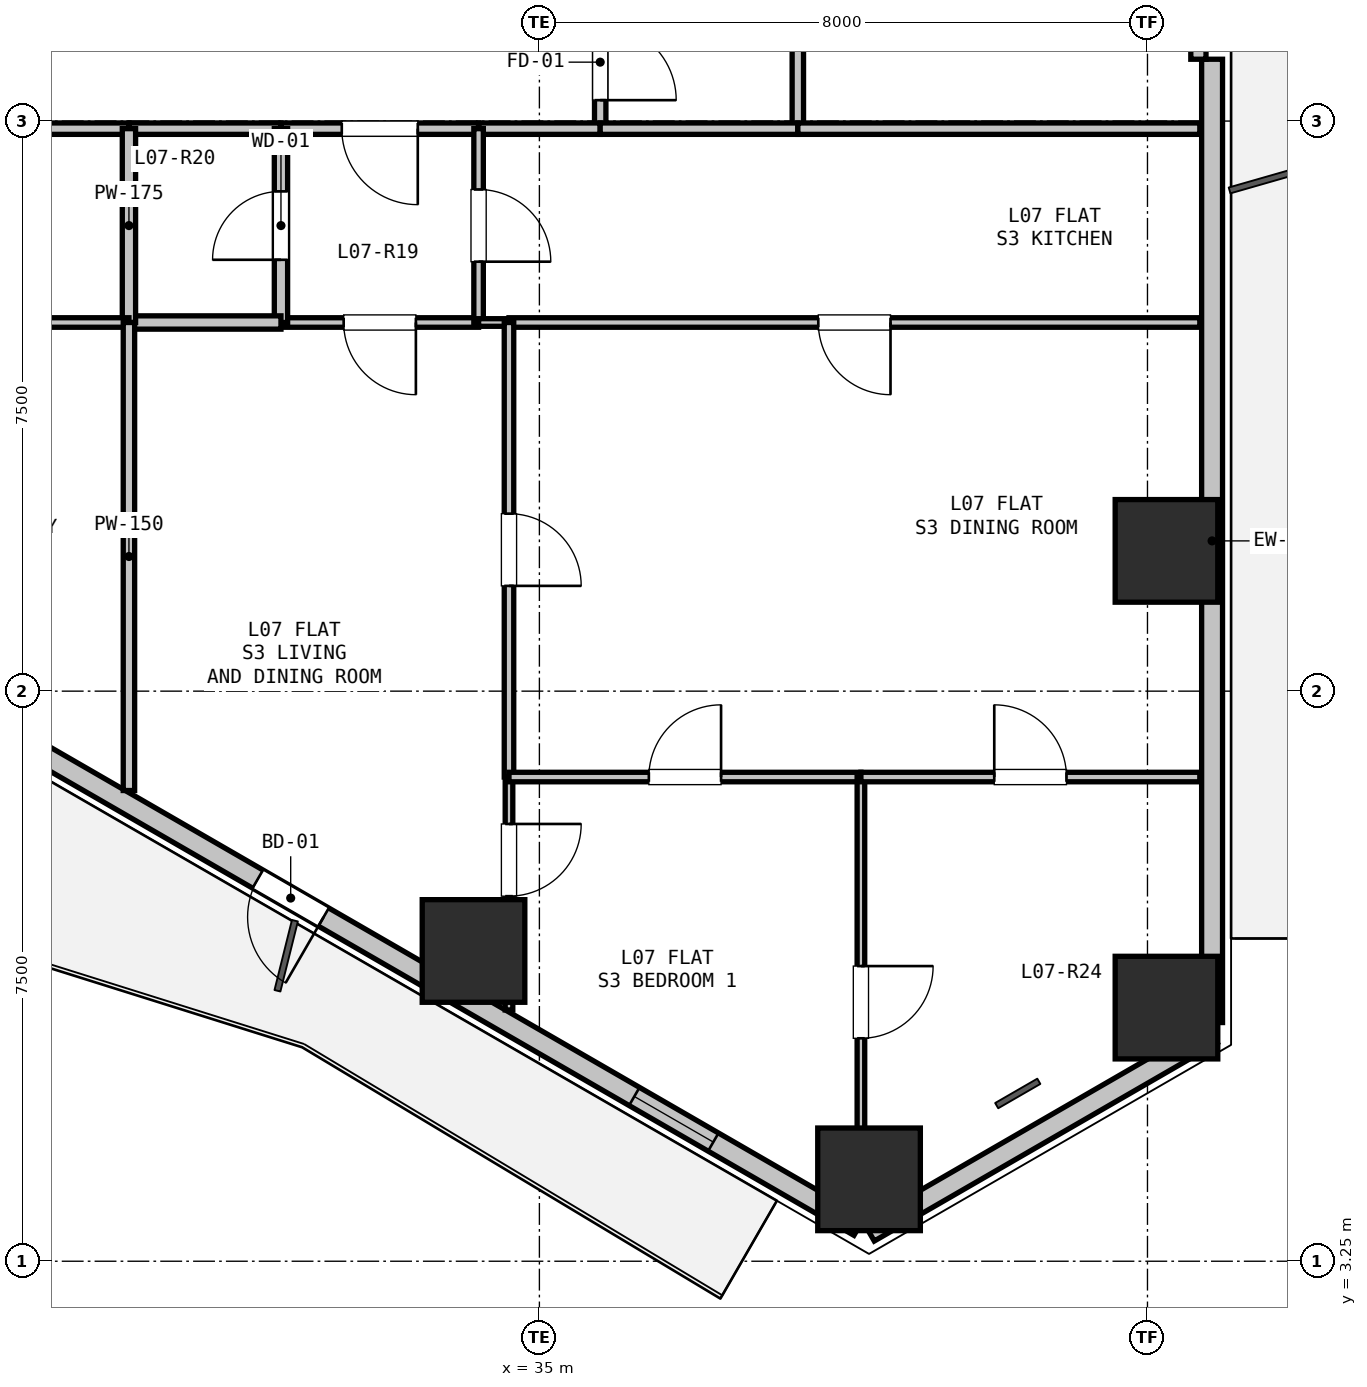
"""IFC4 building model, lengths in metres.
Left out: names, types, materials, properties, quantities, classifications, styles, units other than length and angle.
Written with IfcOpenShell. Run it as: python <this file> out.ifc"""

import sys

from ifc_helpers import new_model, si_unit, direction, frame, frame_2d, origin, origin_2d, place, context, subcontext, project, spatial, rectangle, hollow_rectangle, extrude, element, fill, save


model = new_model("IFC4")
c1 = context("Model", 3, precision=1e-05, world=origin(), true_north=direction((0.0, 1.0)))
c2 = subcontext(c1, "Body", "Model", "MODEL_VIEW")
j1 = project(units=[si_unit("LENGTHUNIT", "METRE"), si_unit("PLANEANGLEUNIT", "RADIAN")], contexts=[c1])
p1 = place(None, origin())
s1 = spatial("IfcSite", under=j1, at=p1, CompositionType="ELEMENT")
p2 = place(p1, origin())
s2 = spatial("IfcBuilding", under=s1, at=p2, CompositionType="ELEMENT")
p3 = place(p2, frame((0.0, 0.0, 29.1)))
s3 = spatial("IfcBuildingStorey", under=s2, at=p3, CompositionType="ELEMENT", Elevation=29.1)
for number, where, z_axis, x_axis in (
    (1, (43.25, 12.595, 0.0), (0.0, 0.0, 1.0), (1.0, 0.0, 0.0)),
    (2, (43.25, 6.587, 0.0), (0.0, 0.0, 1.0), (1.0, 0.0, 0.0)),
    (3, (39.337, 4.327, 0.0), (0.0, 0.0, 1.0), (1.0, 0.0, 0.0)),
    (4, (34.133, 7.332, 0.0), (0.0, 0.0, 1.0), (1.0, 0.0, 0.0)),
):
    element("IfcColumn", number, at=place(p3, frame(where, z_axis=z_axis, x_axis=x_axis)), inside=s3, PredefinedType="COLUMN", context=c2, shape_type="SweptSolid", body=[
        extrude(hollow_rectangle(XDim=1.35, YDim=1.35, WallThickness=0.036, at=origin_2d()), origin(), (0.0, 0.0, 1.0), 3.3),
    ])
p4 = place(p3, frame((43.85, 6.24, 0.0), z_axis=(0.0, 0.0, 1.0), x_axis=(-0.866043601342, -0.499968479581, 0.0)))
e5 = element("IfcWall", 5, at=p4, inside=s3, PredefinedType="SOLIDWALL", context=c2, shape_type="SweptSolid", body=[
    extrude(rectangle(XDim=5.211, YDim=0.275, at=frame_2d((2.605, 0.0))), origin(), (0.0, 0.0, 1.0), 2.66),
])
p5 = place(p3, frame((43.85, 19.063, 0.0), z_axis=(0.0, 0.0, 1.0), x_axis=(0.0, -1.0, 0.0)))
e6 = element("IfcWall", 6, at=p5, inside=s3, PredefinedType="SOLIDWALL", context=c2, shape_type="SweptSolid", body=[
    extrude(rectangle(XDim=12.673, YDim=0.275, at=frame_2d((6.336, 0.0))), origin(), (0.0, 0.0, 1.0), 2.66),
])
p6 = place(p3, frame((43.67, 20.763, 0.0), z_axis=(0.0, 0.0, 1.0), x_axis=(0.0, -1.0, 0.0)))
e7 = element("IfcWall", 7, at=p6, inside=s3, PredefinedType="PARAPET", context=c2, shape_type="SweptSolid", body=[
    extrude(rectangle(XDim=1.7, YDim=0.2, at=frame_2d((0.85, 0.0))), origin(), (0.0, 0.0, 1.0), 2.66),
])
p7 = place(p3, frame((39.207, 3.71, 0.0), z_axis=(0.0, 0.0, 1.0), x_axis=(-0.86603192154, 0.499988710747, 0.0)))
e8 = element("IfcWall", 8, at=p7, inside=s3, PredefinedType="SOLIDWALL", context=c2, shape_type="SweptSolid", body=[
    extrude(rectangle(XDim=12.673, YDim=0.275, at=frame_2d((6.336, 0.0))), origin(), (0.0, 0.0, 1.0), 2.66),
])
p8 = place(p7, frame((8.136, 0.0, 0.0)))
e9 = element("IfcOpeningElement", 9, at=p8, cuts=e8, PredefinedType="OPENING", context=c2, shape_type="SweptSolid", body=[
    extrude(rectangle(XDim=1.0, YDim=2.1, at=frame_2d((0.5, 1.05))), frame((0.0, 0.147, 0.0), z_axis=(0.0, -1.0, 0.0), x_axis=(1.0, 0.0, 0.0)), (0.0, 0.0, 1.0), 0.295),
])
p9 = place(p7, frame((2.216, 0.0, 0.9)))
e10 = element("IfcOpeningElement", 10, at=p9, cuts=e8, PredefinedType="OPENING", context=c2, shape_type="SweptSolid", body=[
    extrude(rectangle(XDim=1.2, YDim=1.4, at=frame_2d((0.6, 0.7))), frame((0.0, 0.147, 0.0), z_axis=(0.0, -1.0, 0.0), x_axis=(1.0, 0.0, 0.0)), (0.0, 0.0, 1.0), 0.295),
])
p10 = place(p3, frame((35.8, 19.9, 0.0), z_axis=(0.0, 0.0, 1.0), x_axis=(0.0, -1.0, 0.0)))
e11 = element("IfcWall", 11, at=p10, inside=s3, PredefinedType="PARTITIONING", context=c2, shape_type="SweptSolid", body=[
    extrude(rectangle(XDim=1.75, YDim=0.15, at=frame_2d((0.875, 0.0))), origin(), (0.0, 0.0, 1.0), 3.04),
])
p11 = place(p10, frame((0.375, 0.0, 0.0)))
e12 = element("IfcOpeningElement", 12, at=p11, cuts=e11, PredefinedType="OPENING", context=c2, shape_type="SweptSolid", body=[
    extrude(rectangle(XDim=1.0, YDim=2.15, at=frame_2d((0.5, 1.075))), frame((0.0, 0.085, 0.0), z_axis=(0.0, -1.0, 0.0), x_axis=(1.0, 0.0, 0.0)), (0.0, 0.0, 1.0), 0.17),
])
p12 = place(p3, frame((35.8, 18.15, 0.0), z_axis=(0.0, 0.0, 1.0), x_axis=(-1.0, 0.0, 0.0)))
e13 = element("IfcWall", 13, at=p12, inside=s3, PredefinedType="PARTITIONING", context=c2, shape_type="SweptSolid", body=[
    extrude(rectangle(XDim=1.6, YDim=0.15, at=frame_2d((0.8, 0.0))), origin(), (0.0, 0.0, 1.0), 3.04),
])
p13 = place(p3, frame((34.2, 18.15, 0.0), z_axis=(0.0, 0.0, 1.0), x_axis=(-1.0, 0.0, 0.0)))
e14 = element("IfcWall", 14, at=p13, inside=s3, PredefinedType="PARTITIONING", context=c2, shape_type="SweptSolid", body=[
    extrude(rectangle(XDim=2.6, YDim=0.15, at=frame_2d((1.3, 0.0))), origin(), (0.0, 0.0, 1.0), 3.04),
])
p14 = place(p13, frame((0.8, 0.0, 0.0)))
e15 = element("IfcOpeningElement", 15, at=p14, cuts=e14, PredefinedType="OPENING", context=c2, shape_type="SweptSolid", body=[
    extrude(rectangle(XDim=1.0, YDim=2.15, at=frame_2d((0.5, 1.075))), frame((0.0, 0.085, 0.0), z_axis=(0.0, -1.0, 0.0), x_axis=(1.0, 0.0, 0.0)), (0.0, 0.0, 1.0), 0.17),
])
p15 = place(p3, frame((31.6, 18.15, 0.0), z_axis=(0.0, 0.0, 1.0), x_axis=(-1.0, 0.0, 0.0)))
e16 = element("IfcWall", 16, at=p15, inside=s3, PredefinedType="PARTITIONING", context=c2, shape_type="SweptSolid", body=[
    extrude(rectangle(XDim=2.0, YDim=0.15, at=frame_2d((1.0, 0.0))), origin(), (0.0, 0.0, 1.0), 3.04),
])
p16 = place(p3, frame((29.6, 18.15, 0.0), z_axis=(0.0, 0.0, 1.0), x_axis=(-1.0, 0.0, 0.0)))
e17 = element("IfcWall", 17, at=p16, inside=s3, PredefinedType="PARTITIONING", context=c2, shape_type="SweptSolid", body=[
    extrude(rectangle(XDim=2.5, YDim=0.15, at=frame_2d((1.25, 0.0))), origin(), (0.0, 0.0, 1.0), 3.04),
])
p17 = place(p3, frame((38.4, 21.4, 0.0), z_axis=(0.0, 0.0, 1.0), x_axis=(0.0, -1.0, 0.0)))
e18 = element("IfcWall", 18, at=p17, inside=s3, PredefinedType="PARTITIONING", context=c2, shape_type="SweptSolid", body=[
    extrude(rectangle(XDim=3.25, YDim=0.15, at=frame_2d((1.625, 0.0))), origin(), (0.0, 0.0, 1.0), 3.04),
])
p18 = place(p3, frame((38.4, 18.15, 0.0), z_axis=(0.0, 0.0, 1.0), x_axis=(-1.0, 0.0, 0.0)))
e19 = element("IfcWall", 19, at=p18, inside=s3, PredefinedType="PARTITIONING", context=c2, shape_type="SweptSolid", body=[
    extrude(rectangle(XDim=2.6, YDim=0.15, at=frame_2d((1.3, 0.0))), origin(), (0.0, 0.0, 1.0), 2.337),
])
p19 = place(p3, frame((34.2, 15.6, 0.0), z_axis=(0.0, 0.0, 1.0), x_axis=(-1.0, 0.0, 0.0)))
e20 = element("IfcWall", 20, at=p19, inside=s3, PredefinedType="PARTITIONING", context=c2, shape_type="SweptSolid", body=[
    extrude(rectangle(XDim=2.6, YDim=0.125, at=frame_2d((1.3, 0.0))), origin(), (0.0, 0.0, 1.0), 3.04),
])
p20 = place(p19, frame((0.825, 0.0, 0.0)))
e21 = element("IfcOpeningElement", 21, at=p20, cuts=e20, PredefinedType="OPENING", context=c2, shape_type="SweptSolid", body=[
    extrude(rectangle(XDim=0.95, YDim=2.1, at=frame_2d((0.475, 1.05))), frame((0.0, 0.073, 0.0), z_axis=(0.0, -1.0, 0.0), x_axis=(1.0, 0.0, 0.0)), (0.0, 0.0, 1.0), 0.145),
])
p21 = place(p3, frame((31.6, 15.6, 0.0), z_axis=(0.0, 0.0, 1.0), x_axis=(0.0, 1.0, 0.0)))
e22 = element("IfcWall", 22, at=p21, inside=s3, PredefinedType="PLUMBINGWALL", context=c2, shape_type="SweptSolid", body=[
    extrude(rectangle(XDim=2.55, YDim=0.175, at=frame_2d((1.275, 0.0))), origin(), (0.0, 0.0, 1.0), 3.04),
])
p22 = place(p21, frame((0.825, 0.0, 0.0)))
e23 = element("IfcOpeningElement", 23, at=p22, cuts=e22, PredefinedType="OPENING", context=c2, shape_type="SweptSolid", body=[
    extrude(rectangle(XDim=0.9, YDim=2.1, at=frame_2d((0.45, 1.05))), frame((0.0, 0.097, 0.0), z_axis=(0.0, -1.0, 0.0), x_axis=(1.0, 0.0, 0.0)), (0.0, 0.0, 1.0), 0.195),
])
p23 = place(p3, frame((34.2, 18.15, 0.0), z_axis=(0.0, 0.0, 1.0), x_axis=(0.0, -1.0, 0.0)))
e24 = element("IfcWall", 24, at=p23, inside=s3, PredefinedType="PARTITIONING", context=c2, shape_type="SweptSolid", body=[
    extrude(rectangle(XDim=2.55, YDim=0.125, at=frame_2d((1.275, 0.0))), origin(), (0.0, 0.0, 1.0), 3.04),
])
p24 = place(p23, frame((0.8, 0.0, 0.0)))
e25 = element("IfcOpeningElement", 25, at=p24, cuts=e24, PredefinedType="OPENING", context=c2, shape_type="SweptSolid", body=[
    extrude(rectangle(XDim=0.95, YDim=2.1, at=frame_2d((0.475, 1.05))), frame((0.0, 0.073, 0.0), z_axis=(0.0, -1.0, 0.0), x_axis=(1.0, 0.0, 0.0)), (0.0, 0.0, 1.0), 0.145),
])
p25 = place(p3, frame((31.6, 15.6, 0.0), z_axis=(0.0, 0.0, 1.0), x_axis=(-1.0, 0.0, 0.0)))
e26 = element("IfcWall", 26, at=p25, inside=s3, PredefinedType="PLUMBINGWALL", context=c2, shape_type="SweptSolid", body=[
    extrude(rectangle(XDim=2.0, YDim=0.175, at=frame_2d((1.0, 0.0))), origin(), (0.0, 0.0, 1.0), 3.04),
])
p26 = place(p3, frame((29.6, 15.6, 0.0), z_axis=(0.0, 0.0, 1.0), x_axis=(0.0, 1.0, 0.0)))
e27 = element("IfcWall", 27, at=p26, inside=s3, PredefinedType="PLUMBINGWALL", context=c2, shape_type="SweptSolid", body=[
    extrude(rectangle(XDim=2.55, YDim=0.175, at=frame_2d((1.275, 0.0))), origin(), (0.0, 0.0, 1.0), 3.04),
])
p27 = place(p3, frame((38.4, 18.15, 0.0), z_axis=(0.0, 0.0, 1.0), x_axis=(1.0, 0.0, 0.0)))
e28 = element("IfcWall", 28, at=p27, inside=s3, PredefinedType="PARTITIONING", context=c2, shape_type="SweptSolid", body=[
    extrude(rectangle(XDim=5.289, YDim=0.15, at=frame_2d((2.644, 0.0))), origin(), (0.0, 0.0, 1.0), 2.365),
])
p28 = place(p3, frame((43.688, 15.6, 0.0), z_axis=(0.0, 0.0, 1.0), x_axis=(-1.0, 0.0, 0.0)))
e29 = element("IfcWall", 29, at=p28, inside=s3, PredefinedType="PARTITIONING", context=c2, shape_type="SweptSolid", body=[
    extrude(rectangle(XDim=9.088, YDim=0.125, at=frame_2d((4.544, 0.0))), origin(), (0.0, 0.0, 1.0), 2.337),
])
p29 = place(p28, frame((4.069, 0.0, 0.0)))
e30 = element("IfcOpeningElement", 30, at=p29, cuts=e29, PredefinedType="OPENING", context=c2, shape_type="SweptSolid", body=[
    extrude(rectangle(XDim=0.95, YDim=2.1, at=frame_2d((0.475, 1.05))), frame((0.0, 0.073, 0.0), z_axis=(0.0, -1.0, 0.0), x_axis=(1.0, 0.0, 0.0)), (0.0, 0.0, 1.0), 0.145),
])
p30 = place(p3, frame((34.6, 15.6, 0.0), z_axis=(0.0, 0.0, 1.0), x_axis=(-1.0, 0.0, 0.0)))
e31 = element("IfcWall", 31, at=p30, inside=s3, PredefinedType="PARTITIONING", context=c2, shape_type="SweptSolid", body=[
    extrude(rectangle(XDim=0.4, YDim=0.1, at=frame_2d((0.2, 0.0))), origin(), (0.0, 0.0, 1.0), 3.04),
])
p31 = place(p3, frame((27.1, 15.6, 0.0), z_axis=(0.0, 0.0, 1.0), x_axis=(1.0, 0.0, 0.0)))
e32 = element("IfcWall", 32, at=p31, inside=s3, PredefinedType="PARTITIONING", context=c2, shape_type="SweptSolid", body=[
    extrude(rectangle(XDim=2.5, YDim=0.125, at=frame_2d((1.25, 0.0))), origin(), (0.0, 0.0, 1.0), 3.04),
])
p32 = place(p3, frame((29.6, 15.6, 0.0), z_axis=(0.0, 0.0, 1.0), x_axis=(0.0, -1.0, 0.0)))
e33 = element("IfcWall", 33, at=p32, inside=s3, PredefinedType="PARTITIONING", context=c2, shape_type="SweptSolid", body=[
    extrude(rectangle(XDim=6.157, YDim=0.15, at=frame_2d((3.079, 0.0))), origin(), (0.0, 0.0, 1.0), 2.337),
])
p33 = place(p3, frame((34.6, 15.6, 0.0), z_axis=(0.0, 0.0, 1.0), x_axis=(0.0, -1.0, 0.0)))
e34 = element("IfcWall", 34, at=p33, inside=s3, PredefinedType="PARTITIONING", context=c2, shape_type="SweptSolid", body=[
    extrude(rectangle(XDim=5.98, YDim=0.125, at=frame_2d((2.99, 0.0))), origin(), (0.0, 0.0, 1.0), 3.04),
])
p34 = place(p33, frame((2.515, 0.0, 0.0)))
e35 = element("IfcOpeningElement", 35, at=p34, cuts=e34, PredefinedType="OPENING", context=c2, shape_type="SweptSolid", body=[
    extrude(rectangle(XDim=0.95, YDim=2.1, at=frame_2d((0.475, 1.05))), frame((0.0, 0.073, 0.0), z_axis=(0.0, -1.0, 0.0), x_axis=(1.0, 0.0, 0.0)), (0.0, 0.0, 1.0), 0.145),
])
p35 = place(p3, frame((34.6, 9.62, 0.0), z_axis=(0.0, 0.0, 1.0), x_axis=(0.0, -1.0, 0.0)))
e36 = element("IfcWall", 36, at=p35, inside=s3, PredefinedType="PARTITIONING", context=c2, shape_type="SweptSolid", body=[
    extrude(rectangle(XDim=3.064, YDim=0.1, at=frame_2d((1.532, 0.0))), origin(), (0.0, 0.0, 1.0), 2.65),
])
p36 = place(p35, frame((0.617, 0.0, 0.0)))
e37 = element("IfcOpeningElement", 37, at=p36, cuts=e36, PredefinedType="OPENING", context=c2, shape_type="SweptSolid", body=[
    extrude(rectangle(XDim=0.95, YDim=2.1, at=frame_2d((0.475, 1.05))), frame((0.0, 0.06, 0.0), z_axis=(0.0, -1.0, 0.0), x_axis=(1.0, 0.0, 0.0)), (0.0, 0.0, 1.0), 0.12),
])
p37 = place(p3, frame((34.6, 9.62, 0.0), z_axis=(0.0, 0.0, 1.0), x_axis=(1.0, 0.0, 0.0)))
e38 = element("IfcWall", 38, at=p37, inside=s3, PredefinedType="PARTITIONING", context=c2, shape_type="SweptSolid", body=[
    extrude(rectangle(XDim=4.63, YDim=0.125, at=frame_2d((2.315, 0.0))), origin(), (0.0, 0.0, 1.0), 3.04),
])
p38 = place(p37, frame((1.84, 0.0, 0.0)))
e39 = element("IfcOpeningElement", 39, at=p38, cuts=e38, PredefinedType="OPENING", context=c2, shape_type="SweptSolid", body=[
    extrude(rectangle(XDim=0.95, YDim=2.1, at=frame_2d((0.475, 1.05))), frame((0.0, 0.073, 0.0), z_axis=(0.0, -1.0, 0.0), x_axis=(1.0, 0.0, 0.0)), (0.0, 0.0, 1.0), 0.145),
])
p39 = place(p3, frame((39.23, 9.62, 0.0), z_axis=(0.0, 0.0, 1.0), x_axis=(0.0, -1.0, 0.0)))
e40 = element("IfcWall", 40, at=p39, inside=s3, PredefinedType="PARTITIONING", context=c2, shape_type="SweptSolid", body=[
    extrude(rectangle(XDim=5.924, YDim=0.1, at=frame_2d((2.962, 0.0))), origin(), (0.0, 0.0, 1.0), 3.04),
])
p40 = place(p39, frame((2.487, 0.0, 0.0)))
e41 = element("IfcOpeningElement", 41, at=p40, cuts=e40, PredefinedType="OPENING", context=c2, shape_type="SweptSolid", body=[
    extrude(rectangle(XDim=0.95, YDim=2.1, at=frame_2d((0.475, 1.05))), frame((0.0, 0.06, 0.0), z_axis=(0.0, -1.0, 0.0), x_axis=(1.0, 0.0, 0.0)), (0.0, 0.0, 1.0), 0.12),
])
p41 = place(p3, frame((39.23, 9.62, 0.0), z_axis=(0.0, 0.0, 1.0), x_axis=(1.0, 0.0, 0.0)))
e42 = element("IfcWall", 42, at=p41, inside=s3, PredefinedType="PARTITIONING", context=c2, shape_type="SweptSolid", body=[
    extrude(rectangle(XDim=4.458, YDim=0.125, at=frame_2d((2.229, 0.0))), origin(), (0.0, 0.0, 1.0), 2.337),
])
p42 = place(p41, frame((1.754, 0.0, 0.0)))
e43 = element("IfcOpeningElement", 43, at=p42, cuts=e42, PredefinedType="OPENING", context=c2, shape_type="SweptSolid", body=[
    extrude(rectangle(XDim=0.95, YDim=2.1, at=frame_2d((0.475, 1.05))), frame((0.0, 0.073, 0.0), z_axis=(0.0, -1.0, 0.0), x_axis=(1.0, 0.0, 0.0)), (0.0, 0.0, 1.0), 0.145),
])
p43 = place(p8, origin())
e44 = element("IfcDoor", 44, at=p43, inside=s3, OperationType="SINGLE_SWING_LEFT", PredefinedType="DOOR", context=c2, shape_type="SweptSolid", body=[
    extrude(rectangle(XDim=1.0, YDim=2.1, at=frame_2d((0.5, 1.05))), frame((0.0, 0.025, 0.0), z_axis=(0.0, -1.0, 0.0), x_axis=(1.0, 0.0, 0.0)), (0.0, 0.0, 1.0), 0.05),
])
fill(e9, e44)
p44 = place(p9, origin())
e45 = element("IfcWindow", 45, at=p44, inside=s3, PartitioningType="SINGLE_PANEL", PredefinedType="WINDOW", context=c2, shape_type="SweptSolid", body=[
    extrude(rectangle(XDim=1.2, YDim=1.4, at=frame_2d((0.6, 0.7))), frame((0.0, 0.03, 0.0), z_axis=(0.0, -1.0, 0.0), x_axis=(1.0, 0.0, 0.0)), (0.0, 0.0, 1.0), 0.06),
])
fill(e10, e45)
p45 = place(p11, origin())
e46 = element("IfcDoor", 46, at=p45, inside=s3, OperationType="SINGLE_SWING_RIGHT", PredefinedType="DOOR", context=c2, shape_type="SweptSolid", body=[
    extrude(rectangle(XDim=1.0, YDim=2.15, at=frame_2d((0.5, 1.075))), frame((0.0, 0.025, 0.0), z_axis=(0.0, -1.0, 0.0), x_axis=(1.0, 0.0, 0.0)), (0.0, 0.0, 1.0), 0.05),
])
fill(e12, e46)
p46 = place(p14, origin())
e47 = element("IfcDoor", 47, at=p46, inside=s3, OperationType="SINGLE_SWING_LEFT", PredefinedType="DOOR", context=c2, shape_type="SweptSolid", body=[
    extrude(rectangle(XDim=1.0, YDim=2.15, at=frame_2d((0.5, 1.075))), frame((0.0, 0.025, 0.0), z_axis=(0.0, -1.0, 0.0), x_axis=(1.0, 0.0, 0.0)), (0.0, 0.0, 1.0), 0.05),
])
fill(e15, e47)
p47 = place(p22, origin())
e48 = element("IfcDoor", 48, at=p47, inside=s3, OperationType="SINGLE_SWING_LEFT", PredefinedType="DOOR", context=c2, shape_type="SweptSolid", body=[
    extrude(rectangle(XDim=0.9, YDim=2.1, at=frame_2d((0.45, 1.05))), frame((0.0, 0.025, 0.0), z_axis=(0.0, -1.0, 0.0), x_axis=(1.0, 0.0, 0.0)), (0.0, 0.0, 1.0), 0.05),
])
fill(e23, e48)
p48 = place(p24, origin())
e49 = element("IfcDoor", 49, at=p48, inside=s3, OperationType="SINGLE_SWING_RIGHT", PredefinedType="DOOR", context=c2, shape_type="SweptSolid", body=[
    extrude(rectangle(XDim=0.95, YDim=2.1, at=frame_2d((0.475, 1.05))), frame((0.0, 0.025, 0.0), z_axis=(0.0, -1.0, 0.0), x_axis=(1.0, 0.0, 0.0)), (0.0, 0.0, 1.0), 0.05),
])
fill(e25, e49)
p49 = place(p20, origin())
e50 = element("IfcDoor", 50, at=p49, inside=s3, OperationType="SINGLE_SWING_LEFT", PredefinedType="DOOR", context=c2, shape_type="SweptSolid", body=[
    extrude(rectangle(XDim=0.95, YDim=2.1, at=frame_2d((0.475, 1.05))), frame((0.0, 0.025, 0.0), z_axis=(0.0, -1.0, 0.0), x_axis=(1.0, 0.0, 0.0)), (0.0, 0.0, 1.0), 0.05),
])
fill(e21, e50)
p50 = place(p29, origin())
e51 = element("IfcDoor", 51, at=p50, inside=s3, OperationType="SINGLE_SWING_LEFT", PredefinedType="DOOR", context=c2, shape_type="SweptSolid", body=[
    extrude(rectangle(XDim=0.95, YDim=2.1, at=frame_2d((0.475, 1.05))), frame((0.0, 0.025, 0.0), z_axis=(0.0, -1.0, 0.0), x_axis=(1.0, 0.0, 0.0)), (0.0, 0.0, 1.0), 0.05),
])
fill(e30, e51)
p51 = place(p36, origin())
e52 = element("IfcDoor", 52, at=p51, inside=s3, OperationType="SINGLE_SWING_LEFT", PredefinedType="DOOR", context=c2, shape_type="SweptSolid", body=[
    extrude(rectangle(XDim=0.95, YDim=2.1, at=frame_2d((0.475, 1.05))), frame((0.0, 0.025, 0.0), z_axis=(0.0, -1.0, 0.0), x_axis=(1.0, 0.0, 0.0)), (0.0, 0.0, 1.0), 0.05),
])
fill(e37, e52)
p52 = place(p34, origin())
e53 = element("IfcDoor", 53, at=p52, inside=s3, OperationType="SINGLE_SWING_RIGHT", PredefinedType="DOOR", context=c2, shape_type="SweptSolid", body=[
    extrude(rectangle(XDim=0.95, YDim=2.1, at=frame_2d((0.475, 1.05))), frame((0.0, 0.025, 0.0), z_axis=(0.0, -1.0, 0.0), x_axis=(1.0, 0.0, 0.0)), (0.0, 0.0, 1.0), 0.05),
])
fill(e35, e53)
p53 = place(p40, origin())
e54 = element("IfcDoor", 54, at=p53, inside=s3, OperationType="SINGLE_SWING_LEFT", PredefinedType="DOOR", context=c2, shape_type="SweptSolid", body=[
    extrude(rectangle(XDim=0.95, YDim=2.1, at=frame_2d((0.475, 1.05))), frame((0.0, 0.025, 0.0), z_axis=(0.0, -1.0, 0.0), x_axis=(1.0, 0.0, 0.0)), (0.0, 0.0, 1.0), 0.05),
])
fill(e41, e54)
p54 = place(p38, origin())
e55 = element("IfcDoor", 55, at=p54, inside=s3, OperationType="SINGLE_SWING_RIGHT", PredefinedType="DOOR", context=c2, shape_type="SweptSolid", body=[
    extrude(rectangle(XDim=0.95, YDim=2.1, at=frame_2d((0.475, 1.05))), frame((0.0, 0.025, 0.0), z_axis=(0.0, -1.0, 0.0), x_axis=(1.0, 0.0, 0.0)), (0.0, 0.0, 1.0), 0.05),
])
fill(e39, e55)
p55 = place(p42, origin())
e56 = element("IfcDoor", 56, at=p55, inside=s3, OperationType="SINGLE_SWING_LEFT", PredefinedType="DOOR", context=c2, shape_type="SweptSolid", body=[
    extrude(rectangle(XDim=0.95, YDim=2.1, at=frame_2d((0.475, 1.05))), frame((0.0, 0.025, 0.0), z_axis=(0.0, -1.0, 0.0), x_axis=(1.0, 0.0, 0.0)), (0.0, 0.0, 1.0), 0.05),
])
fill(e43, e56)
save(model, sys.argv[1])
